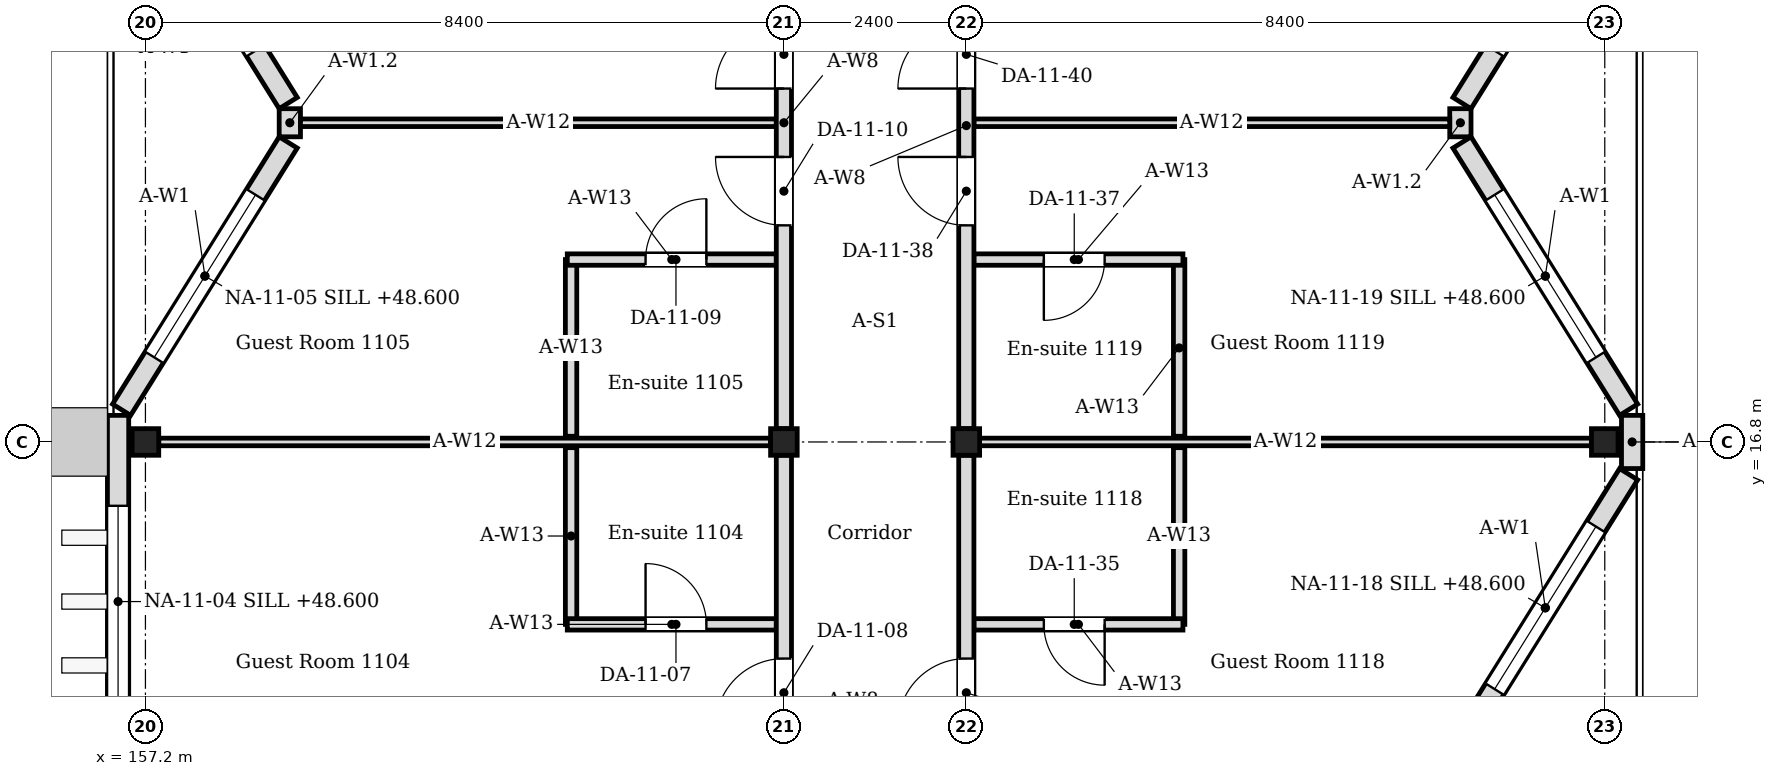
"""IFC4 building model, lengths in metres.
Left out: names, types, materials, properties, quantities, classifications, styles, units other than length and angle.
Written with IfcOpenShell. Run it as: python <this file> out.ifc"""

import sys

from ifc_helpers import new_model, si_unit, direction, frame, frame_2d, origin, origin_2d, place, context, subcontext, project, spatial, rectangle, i_section, extrude, element, fill, save


model = new_model("IFC4")
c1 = context("Model", 3, precision=1e-05, world=origin(), true_north=direction((0.0, 1.0)))
c2 = subcontext(c1, "Body", "Model", "MODEL_VIEW")
j1 = project(units=[si_unit("LENGTHUNIT", "METRE"), si_unit("PLANEANGLEUNIT", "RADIAN")], contexts=[c1])
p1 = place(None, origin())
s1 = spatial("IfcSite", under=j1, at=p1, CompositionType="ELEMENT")
p2 = place(p1, origin())
s2 = spatial("IfcBuilding", under=s1, at=p2, CompositionType="ELEMENT")
p3 = place(p2, frame((0.0, 0.0, 48.0)))
s3 = spatial("IfcBuildingStorey", under=s2, at=p3, CompositionType="ELEMENT", Elevation=48.0)
for number, where, z_axis, x_axis in (
    (1, (157.2, 16.8, 0.0), (0.0, 0.0, 1.0), (1.0, 0.0, 0.0)),
    (2, (165.6, 16.8, 0.0), (0.0, 0.0, 1.0), (1.0, 0.0, 0.0)),
    (3, (168.0, 16.8, 0.0), (0.0, 0.0, 1.0), (1.0, 0.0, 0.0)),
    (4, (176.4, 16.8, 0.0), (0.0, 0.0, 1.0), (1.0, 0.0, 0.0)),
):
    element("IfcColumn", number, at=place(p3, frame(where, z_axis=z_axis, x_axis=x_axis)), inside=s3, PredefinedType="COLUMN", context=c2, shape_type="SweptSolid", body=[
        extrude(i_section(OverallWidth=0.35, OverallDepth=0.35, WebThickness=0.012, FlangeThickness=0.019, FilletRadius=0.013, at=origin_2d()), origin(), (0.0, 0.0, 1.0), 4.2),
    ])
p4 = place(p3, frame((156.84, 8.05, 0.0), z_axis=(0.0, 0.0, 1.0), x_axis=(0.0, 1.0, 0.0)))
e5 = element("IfcWall", 5, at=p4, inside=s3, PredefinedType="SOLIDWALL", context=c2, shape_type="SweptSolid", body=[
    extrude(rectangle(XDim=9.1, YDim=0.28, at=frame_2d((4.55, 0.0))), origin(), (0.0, 0.0, 1.0), 4.05),
])
p5 = place(p4, frame((1.19, 0.0, 0.6)))
e6 = element("IfcOpeningElement", 6, at=p5, cuts=e5, PredefinedType="OPENING", context=c2, shape_type="SweptSolid", body=[
    extrude(rectangle(XDim=2.52, YDim=2.4, at=frame_2d((1.26, 1.2))), frame((0.0, 0.15, 0.0), z_axis=(0.0, -1.0, 0.0), x_axis=(1.0, 0.0, 0.0)), (0.0, 0.0, 1.0), 0.3),
])
p6 = place(p4, frame((5.39, 0.0, 0.6)))
e7 = element("IfcOpeningElement", 7, at=p6, cuts=e5, PredefinedType="OPENING", context=c2, shape_type="SweptSolid", body=[
    extrude(rectangle(XDim=2.52, YDim=2.4, at=frame_2d((1.26, 1.2))), frame((0.0, 0.15, 0.0), z_axis=(0.0, -1.0, 0.0), x_axis=(1.0, 0.0, 0.0)), (0.0, 0.0, 1.0), 0.3),
])
p7 = place(p3, frame((156.886, 17.224, 0.0), z_axis=(0.0, 0.0, 1.0), x_axis=(0.529018946142, 0.848610013271, 0.0)))
e8 = element("IfcWall", 8, at=p7, inside=s3, PredefinedType="SOLIDWALL", context=c2, shape_type="SweptSolid", body=[
    extrude(rectangle(XDim=4.144, YDim=0.28, at=frame_2d((2.072, 0.0))), origin(), (0.0, 0.0, 1.0), 4.05),
])
p8 = place(p7, frame((0.812, 0.0, 0.6)))
e9 = element("IfcOpeningElement", 9, at=p8, cuts=e8, PredefinedType="OPENING", context=c2, shape_type="SweptSolid", body=[
    extrude(rectangle(XDim=2.52, YDim=2.4, at=frame_2d((1.26, 1.2))), frame((0.0, 0.15, 0.0), z_axis=(0.0, -1.0, 0.0), x_axis=(1.0, 0.0, 0.0)), (0.0, 0.0, 1.0), 0.3),
])
p9 = place(p3, frame((159.079, 21.259, 0.0), z_axis=(0.0, 0.0, 1.0), x_axis=(-0.529018946142, 0.848610013271, 0.0)))
e10 = element("IfcWall", 10, at=p9, inside=s3, PredefinedType="SOLIDWALL", context=c2, shape_type="SweptSolid", body=[
    extrude(rectangle(XDim=4.144, YDim=0.28, at=frame_2d((2.072, 0.0))), origin(), (0.0, 0.0, 1.0), 4.05),
])
p10 = place(p9, frame((0.812, 0.0, 0.6)))
e11 = element("IfcOpeningElement", 11, at=p10, cuts=e10, PredefinedType="OPENING", context=c2, shape_type="SweptSolid", body=[
    extrude(rectangle(XDim=2.52, YDim=2.4, at=frame_2d((1.26, 1.2))), frame((0.0, 0.15, 0.0), z_axis=(0.0, -1.0, 0.0), x_axis=(1.0, 0.0, 0.0)), (0.0, 0.0, 1.0), 0.3),
])
p11 = place(p3, frame((159.1, 20.815, 0.0), z_axis=(0.0, 0.0, 1.0), x_axis=(0.0, 1.0, 0.0)))
e12 = element("IfcWall", 12, at=p11, inside=s3, PredefinedType="SOLIDWALL", context=c2, shape_type="SweptSolid", body=[
    extrude(rectangle(XDim=0.37, YDim=0.28, at=frame_2d((0.185, 0.0))), origin(), (0.0, 0.0, 1.0), 3.604),
])
p12 = place(p3, frame((174.521, 12.859, 0.0), z_axis=(0.0, 0.0, 1.0), x_axis=(0.528992500338, 0.848626498871, 0.0)))
e13 = element("IfcWall", 13, at=p12, inside=s3, PredefinedType="SOLIDWALL", context=c2, shape_type="SweptSolid", body=[
    extrude(rectangle(XDim=4.145, YDim=0.28, at=frame_2d((2.072, 0.0))), origin(), (0.0, 0.0, 1.0), 4.05),
])
p13 = place(p12, frame((0.812, 0.0, 0.6)))
e14 = element("IfcOpeningElement", 14, at=p13, cuts=e13, PredefinedType="OPENING", context=c2, shape_type="SweptSolid", body=[
    extrude(rectangle(XDim=2.52, YDim=2.4, at=frame_2d((1.26, 1.2))), frame((0.0, 0.15, 0.0), z_axis=(0.0, -1.0, 0.0), x_axis=(1.0, 0.0, 0.0)), (0.0, 0.0, 1.0), 0.3),
])
p14 = place(p3, frame((176.76, 16.45, 0.0), z_axis=(0.0, 0.0, 1.0), x_axis=(0.0, 1.0, 0.0)))
e15 = element("IfcWall", 15, at=p14, inside=s3, PredefinedType="SOLIDWALL", context=c2, shape_type="SweptSolid", body=[
    extrude(rectangle(XDim=0.7, YDim=0.28, at=frame_2d((0.35, 0.0))), origin(), (0.0, 0.0, 1.0), 4.05),
])
p15 = place(p3, frame((176.714, 17.224, 0.0), z_axis=(0.0, 0.0, 1.0), x_axis=(-0.529018946142, 0.848610013271, 0.0)))
e16 = element("IfcWall", 16, at=p15, inside=s3, PredefinedType="SOLIDWALL", context=c2, shape_type="SweptSolid", body=[
    extrude(rectangle(XDim=4.144, YDim=0.28, at=frame_2d((2.072, 0.0))), origin(), (0.0, 0.0, 1.0), 4.05),
])
p16 = place(p15, frame((0.812, 0.0, 0.6)))
e17 = element("IfcOpeningElement", 17, at=p16, cuts=e16, PredefinedType="OPENING", context=c2, shape_type="SweptSolid", body=[
    extrude(rectangle(XDim=2.52, YDim=2.4, at=frame_2d((1.26, 1.2))), frame((0.0, 0.15, 0.0), z_axis=(0.0, -1.0, 0.0), x_axis=(1.0, 0.0, 0.0)), (0.0, 0.0, 1.0), 0.3),
])
p17 = place(p3, frame((174.521, 21.259, 0.0), z_axis=(0.0, 0.0, 1.0), x_axis=(0.529018946142, 0.848610013271, 0.0)))
e18 = element("IfcWall", 18, at=p17, inside=s3, PredefinedType="SOLIDWALL", context=c2, shape_type="SweptSolid", body=[
    extrude(rectangle(XDim=4.144, YDim=0.28, at=frame_2d((2.072, 0.0))), origin(), (0.0, 0.0, 1.0), 4.05),
])
p18 = place(p17, frame((0.812, 0.0, 0.6)))
e19 = element("IfcOpeningElement", 19, at=p18, cuts=e18, PredefinedType="OPENING", context=c2, shape_type="SweptSolid", body=[
    extrude(rectangle(XDim=2.52, YDim=2.4, at=frame_2d((1.26, 1.2))), frame((0.0, 0.15, 0.0), z_axis=(0.0, -1.0, 0.0), x_axis=(1.0, 0.0, 0.0)), (0.0, 0.0, 1.0), 0.3),
])
p19 = place(p3, frame((174.5, 20.815, 0.0), z_axis=(0.0, 0.0, 1.0), x_axis=(0.0, 1.0, 0.0)))
e20 = element("IfcWall", 20, at=p19, inside=s3, PredefinedType="SOLIDWALL", context=c2, shape_type="SweptSolid", body=[
    extrude(rectangle(XDim=0.37, YDim=0.28, at=frame_2d((0.185, 0.0))), origin(), (0.0, 0.0, 1.0), 3.604),
])
p20 = place(p3, frame((162.8, 14.4, 0.0), z_axis=(0.0, 0.0, 1.0), x_axis=(0.0, 1.0, 0.0)))
e21 = element("IfcWall", 21, at=p20, inside=s3, PredefinedType="PARTITIONING", context=c2, shape_type="SweptSolid", body=[
    extrude(rectangle(XDim=2.325, YDim=0.15, at=frame_2d((1.163, 0.0))), origin(), (0.0, 0.0, 1.0), 4.05),
])
p21 = place(p3, frame((162.75, 14.4, 0.0), z_axis=(0.0, 0.0, 1.0), x_axis=(1.0, 0.0, 0.0)))
e22 = element("IfcWall", 22, at=p21, inside=s3, PredefinedType="PARTITIONING", context=c2, shape_type="SweptSolid", body=[
    extrude(rectangle(XDim=2.75, YDim=0.15, at=frame_2d((1.375, 0.0))), origin(), (0.0, 0.0, 1.0), 4.05),
])
p22 = place(p21, frame((1.03, 0.0, 0.0)))
e23 = element("IfcOpeningElement", 23, at=p22, cuts=e22, PredefinedType="OPENING", context=c2, shape_type="SweptSolid", body=[
    extrude(rectangle(XDim=0.8, YDim=2.1, at=frame_2d((0.4, 1.05))), frame((0.0, 0.085, 0.0), z_axis=(0.0, -1.0, 0.0), x_axis=(1.0, 0.0, 0.0)), (0.0, 0.0, 1.0), 0.17),
])
p23 = place(p3, frame((162.8, 16.875, 0.0), z_axis=(0.0, 0.0, 1.0), x_axis=(0.0, 1.0, 0.0)))
e24 = element("IfcWall", 24, at=p23, inside=s3, PredefinedType="PARTITIONING", context=c2, shape_type="SweptSolid", body=[
    extrude(rectangle(XDim=2.325, YDim=0.15, at=frame_2d((1.163, 0.0))), origin(), (0.0, 0.0, 1.0), 4.05),
])
p24 = place(p3, frame((162.75, 19.2, 0.0), z_axis=(0.0, 0.0, 1.0), x_axis=(1.0, 0.0, 0.0)))
e25 = element("IfcWall", 25, at=p24, inside=s3, PredefinedType="PARTITIONING", context=c2, shape_type="SweptSolid", body=[
    extrude(rectangle(XDim=2.75, YDim=0.15, at=frame_2d((1.375, 0.0))), origin(), (0.0, 0.0, 1.0), 4.05),
])
p25 = place(p24, frame((1.03, 0.0, 0.0)))
e26 = element("IfcOpeningElement", 26, at=p25, cuts=e25, PredefinedType="OPENING", context=c2, shape_type="SweptSolid", body=[
    extrude(rectangle(XDim=0.8, YDim=2.1, at=frame_2d((0.4, 1.05))), frame((0.0, 0.085, 0.0), z_axis=(0.0, -1.0, 0.0), x_axis=(1.0, 0.0, 0.0)), (0.0, 0.0, 1.0), 0.17),
])
p26 = place(p3, frame((170.8, 14.4, 0.0), z_axis=(0.0, 0.0, 1.0), x_axis=(0.0, 1.0, 0.0)))
e27 = element("IfcWall", 27, at=p26, inside=s3, PredefinedType="PARTITIONING", context=c2, shape_type="SweptSolid", body=[
    extrude(rectangle(XDim=2.325, YDim=0.15, at=frame_2d((1.163, 0.0))), origin(), (0.0, 0.0, 1.0), 4.05),
])
p27 = place(p3, frame((170.85, 14.4, 0.0), z_axis=(0.0, 0.0, 1.0), x_axis=(-1.0, 0.0, 0.0)))
e28 = element("IfcWall", 28, at=p27, inside=s3, PredefinedType="PARTITIONING", context=c2, shape_type="SweptSolid", body=[
    extrude(rectangle(XDim=2.75, YDim=0.15, at=frame_2d((1.375, 0.0))), origin(), (0.0, 0.0, 1.0), 4.05),
])
p28 = place(p27, frame((1.03, 0.0, 0.0)))
e29 = element("IfcOpeningElement", 29, at=p28, cuts=e28, PredefinedType="OPENING", context=c2, shape_type="SweptSolid", body=[
    extrude(rectangle(XDim=0.8, YDim=2.1, at=frame_2d((0.4, 1.05))), frame((0.0, 0.085, 0.0), z_axis=(0.0, -1.0, 0.0), x_axis=(1.0, 0.0, 0.0)), (0.0, 0.0, 1.0), 0.17),
])
p29 = place(p3, frame((170.8, 16.875, 0.0), z_axis=(0.0, 0.0, 1.0), x_axis=(0.0, 1.0, 0.0)))
e30 = element("IfcWall", 30, at=p29, inside=s3, PredefinedType="PARTITIONING", context=c2, shape_type="SweptSolid", body=[
    extrude(rectangle(XDim=2.325, YDim=0.15, at=frame_2d((1.163, 0.0))), origin(), (0.0, 0.0, 1.0), 4.05),
])
p30 = place(p3, frame((170.85, 19.2, 0.0), z_axis=(0.0, 0.0, 1.0), x_axis=(-1.0, 0.0, 0.0)))
e31 = element("IfcWall", 31, at=p30, inside=s3, PredefinedType="PARTITIONING", context=c2, shape_type="SweptSolid", body=[
    extrude(rectangle(XDim=2.75, YDim=0.15, at=frame_2d((1.375, 0.0))), origin(), (0.0, 0.0, 1.0), 4.05),
])
p31 = place(p30, frame((1.03, 0.0, 0.0)))
e32 = element("IfcOpeningElement", 32, at=p31, cuts=e31, PredefinedType="OPENING", context=c2, shape_type="SweptSolid", body=[
    extrude(rectangle(XDim=0.8, YDim=2.1, at=frame_2d((0.4, 1.05))), frame((0.0, 0.085, 0.0), z_axis=(0.0, -1.0, 0.0), x_axis=(1.0, 0.0, 0.0)), (0.0, 0.0, 1.0), 0.17),
])
for number, where, z_axis, x_axis in (
    (33, (157.375, 16.8, 0.0), (0.0, 0.0, 1.0), (1.0, 0.0, 0.0)),
    (34, (168.175, 16.8, 0.0), (0.0, 0.0, 1.0), (1.0, 0.0, 0.0)),
):
    element("IfcWall", number, at=place(p3, frame(where, z_axis=z_axis, x_axis=x_axis)), inside=s3, PredefinedType="PARTITIONING", context=c2, shape_type="SweptSolid", body=[
        extrude(rectangle(XDim=8.05, YDim=0.1, at=frame_2d((4.025, 0.0))), origin(), (0.0, 0.0, 1.0), 3.604),
    ])
for number, where, z_axis, x_axis in (
    (35, (159.24, 21.0, 0.0), (0.0, 0.0, 1.0), (1.0, 0.0, 0.0)),
    (36, (168.1, 21.0, 0.0), (0.0, 0.0, 1.0), (1.0, 0.0, 0.0)),
):
    element("IfcWall", number, at=place(p3, frame(where, z_axis=z_axis, x_axis=x_axis)), inside=s3, PredefinedType="PARTITIONING", context=c2, shape_type="SweptSolid", body=[
        extrude(rectangle(XDim=6.26, YDim=0.1, at=frame_2d((3.13, 0.0))), origin(), (0.0, 0.0, 1.0), 3.604),
    ])
p32 = place(p3, frame((165.6, 8.575, 0.0), z_axis=(0.0, 0.0, 1.0), x_axis=(0.0, 1.0, 0.0)))
e37 = element("IfcWall", 37, at=p32, inside=s3, PredefinedType="PARTITIONING", context=c2, shape_type="SweptSolid", body=[
    extrude(rectangle(XDim=8.05, YDim=0.2, at=frame_2d((4.025, 0.0))), origin(), (0.0, 0.0, 1.0), 3.45),
])
p33 = place(p32, frame((2.675, 0.0, 0.0)))
e38 = element("IfcOpeningElement", 38, at=p33, cuts=e37, PredefinedType="OPENING", context=c2, shape_type="SweptSolid", body=[
    extrude(rectangle(XDim=0.9, YDim=2.1, at=frame_2d((0.45, 1.05))), frame((0.0, 0.11, 0.0), z_axis=(0.0, -1.0, 0.0), x_axis=(1.0, 0.0, 0.0)), (0.0, 0.0, 1.0), 0.22),
])
p34 = place(p32, frame((4.475, 0.0, 0.0)))
e39 = element("IfcOpeningElement", 39, at=p34, cuts=e37, PredefinedType="OPENING", context=c2, shape_type="SweptSolid", body=[
    extrude(rectangle(XDim=0.9, YDim=2.1, at=frame_2d((0.45, 1.05))), frame((0.0, 0.11, 0.0), z_axis=(0.0, -1.0, 0.0), x_axis=(1.0, 0.0, 0.0)), (0.0, 0.0, 1.0), 0.22),
])
p35 = place(p3, frame((165.6, 16.975, 0.0), z_axis=(0.0, 0.0, 1.0), x_axis=(0.0, 1.0, 0.0)))
e40 = element("IfcWall", 40, at=p35, inside=s3, PredefinedType="PARTITIONING", context=c2, shape_type="SweptSolid", body=[
    extrude(rectangle(XDim=8.05, YDim=0.2, at=frame_2d((4.025, 0.0))), origin(), (0.0, 0.0, 1.0), 3.45),
])
p36 = place(p35, frame((2.675, 0.0, 0.0)))
e41 = element("IfcOpeningElement", 41, at=p36, cuts=e40, PredefinedType="OPENING", context=c2, shape_type="SweptSolid", body=[
    extrude(rectangle(XDim=0.9, YDim=2.1, at=frame_2d((0.45, 1.05))), frame((0.0, 0.11, 0.0), z_axis=(0.0, -1.0, 0.0), x_axis=(1.0, 0.0, 0.0)), (0.0, 0.0, 1.0), 0.22),
])
p37 = place(p35, frame((4.475, 0.0, 0.0)))
e42 = element("IfcOpeningElement", 42, at=p37, cuts=e40, PredefinedType="OPENING", context=c2, shape_type="SweptSolid", body=[
    extrude(rectangle(XDim=0.9, YDim=2.1, at=frame_2d((0.45, 1.05))), frame((0.0, 0.11, 0.0), z_axis=(0.0, -1.0, 0.0), x_axis=(1.0, 0.0, 0.0)), (0.0, 0.0, 1.0), 0.22),
])
p38 = place(p3, frame((168.0, 8.6, 0.0), z_axis=(0.0, 0.0, 1.0), x_axis=(0.0, 1.0, 0.0)))
e43 = element("IfcWall", 43, at=p38, inside=s3, PredefinedType="PARTITIONING", context=c2, shape_type="SweptSolid", body=[
    extrude(rectangle(XDim=8.025, YDim=0.2, at=frame_2d((4.012, 0.0))), origin(), (0.0, 0.0, 1.0), 3.45),
])
p39 = place(p38, frame((2.65, 0.0, 0.0)))
e44 = element("IfcOpeningElement", 44, at=p39, cuts=e43, PredefinedType="OPENING", context=c2, shape_type="SweptSolid", body=[
    extrude(rectangle(XDim=0.9, YDim=2.1, at=frame_2d((0.45, 1.05))), frame((0.0, 0.11, 0.0), z_axis=(0.0, -1.0, 0.0), x_axis=(1.0, 0.0, 0.0)), (0.0, 0.0, 1.0), 0.22),
])
p40 = place(p38, frame((4.45, 0.0, 0.0)))
e45 = element("IfcOpeningElement", 45, at=p40, cuts=e43, PredefinedType="OPENING", context=c2, shape_type="SweptSolid", body=[
    extrude(rectangle(XDim=0.9, YDim=2.1, at=frame_2d((0.45, 1.05))), frame((0.0, 0.11, 0.0), z_axis=(0.0, -1.0, 0.0), x_axis=(1.0, 0.0, 0.0)), (0.0, 0.0, 1.0), 0.22),
])
p41 = place(p3, frame((168.0, 16.975, 0.0), z_axis=(0.0, 0.0, 1.0), x_axis=(0.0, 1.0, 0.0)))
e46 = element("IfcWall", 46, at=p41, inside=s3, PredefinedType="PARTITIONING", context=c2, shape_type="SweptSolid", body=[
    extrude(rectangle(XDim=7.975, YDim=0.2, at=frame_2d((3.987, 0.0))), origin(), (0.0, 0.0, 1.0), 3.45),
])
p42 = place(p41, frame((2.675, 0.0, 0.0)))
e47 = element("IfcOpeningElement", 47, at=p42, cuts=e46, PredefinedType="OPENING", context=c2, shape_type="SweptSolid", body=[
    extrude(rectangle(XDim=0.9, YDim=2.1, at=frame_2d((0.45, 1.05))), frame((0.0, 0.11, 0.0), z_axis=(0.0, -1.0, 0.0), x_axis=(1.0, 0.0, 0.0)), (0.0, 0.0, 1.0), 0.22),
])
p43 = place(p41, frame((4.475, 0.0, 0.0)))
e48 = element("IfcOpeningElement", 48, at=p43, cuts=e46, PredefinedType="OPENING", context=c2, shape_type="SweptSolid", body=[
    extrude(rectangle(XDim=0.9, YDim=2.1, at=frame_2d((0.45, 1.05))), frame((0.0, 0.11, 0.0), z_axis=(0.0, -1.0, 0.0), x_axis=(1.0, 0.0, 0.0)), (0.0, 0.0, 1.0), 0.22),
])
p44 = place(p6, origin())
e49 = element("IfcWindow", 49, at=p44, inside=s3, PartitioningType="SINGLE_PANEL", PredefinedType="WINDOW", context=c2, shape_type="SweptSolid", body=[
    extrude(rectangle(XDim=2.52, YDim=2.4, at=frame_2d((1.26, 1.2))), frame((0.0, 0.03, 0.0), z_axis=(0.0, -1.0, 0.0), x_axis=(1.0, 0.0, 0.0)), (0.0, 0.0, 1.0), 0.06),
])
fill(e7, e49)
p45 = place(p8, origin())
e50 = element("IfcWindow", 50, at=p45, inside=s3, PartitioningType="SINGLE_PANEL", PredefinedType="WINDOW", context=c2, shape_type="SweptSolid", body=[
    extrude(rectangle(XDim=2.52, YDim=2.4, at=frame_2d((1.26, 1.2))), frame((0.0, 0.03, 0.0), z_axis=(0.0, -1.0, 0.0), x_axis=(1.0, 0.0, 0.0)), (0.0, 0.0, 1.0), 0.06),
])
fill(e9, e50)
p46 = place(p13, origin())
e51 = element("IfcWindow", 51, at=p46, inside=s3, PartitioningType="SINGLE_PANEL", PredefinedType="WINDOW", context=c2, shape_type="SweptSolid", body=[
    extrude(rectangle(XDim=2.52, YDim=2.4, at=frame_2d((1.26, 1.2))), frame((0.0, 0.03, 0.0), z_axis=(0.0, -1.0, 0.0), x_axis=(1.0, 0.0, 0.0)), (0.0, 0.0, 1.0), 0.06),
])
fill(e14, e51)
p47 = place(p16, origin())
e52 = element("IfcWindow", 52, at=p47, inside=s3, PartitioningType="SINGLE_PANEL", PredefinedType="WINDOW", context=c2, shape_type="SweptSolid", body=[
    extrude(rectangle(XDim=2.52, YDim=2.4, at=frame_2d((1.26, 1.2))), frame((0.0, 0.03, 0.0), z_axis=(0.0, -1.0, 0.0), x_axis=(1.0, 0.0, 0.0)), (0.0, 0.0, 1.0), 0.06),
])
fill(e17, e52)
p48 = place(p22, origin())
e53 = element("IfcDoor", 53, at=p48, inside=s3, OperationType="SINGLE_SWING_LEFT", PredefinedType="DOOR", context=c2, shape_type="SweptSolid", body=[
    extrude(rectangle(XDim=0.8, YDim=2.1, at=frame_2d((0.4, 1.05))), frame((0.0, 0.025, 0.0), z_axis=(0.0, -1.0, 0.0), x_axis=(1.0, 0.0, 0.0)), (0.0, 0.0, 1.0), 0.05),
])
fill(e23, e53)
p49 = place(p34, origin())
e54 = element("IfcDoor", 54, at=p49, inside=s3, OperationType="SINGLE_SWING_LEFT", PredefinedType="DOOR", context=c2, shape_type="SweptSolid", body=[
    extrude(rectangle(XDim=0.9, YDim=2.1, at=frame_2d((0.45, 1.05))), frame((0.0, 0.025, 0.0), z_axis=(0.0, -1.0, 0.0), x_axis=(1.0, 0.0, 0.0)), (0.0, 0.0, 1.0), 0.05),
])
fill(e39, e54)
p50 = place(p25, origin())
e55 = element("IfcDoor", 55, at=p50, inside=s3, OperationType="SINGLE_SWING_RIGHT", PredefinedType="DOOR", context=c2, shape_type="SweptSolid", body=[
    extrude(rectangle(XDim=0.8, YDim=2.1, at=frame_2d((0.4, 1.05))), frame((0.0, 0.025, 0.0), z_axis=(0.0, -1.0, 0.0), x_axis=(1.0, 0.0, 0.0)), (0.0, 0.0, 1.0), 0.05),
])
fill(e26, e55)
p51 = place(p36, origin())
e56 = element("IfcDoor", 56, at=p51, inside=s3, OperationType="SINGLE_SWING_RIGHT", PredefinedType="DOOR", context=c2, shape_type="SweptSolid", body=[
    extrude(rectangle(XDim=0.9, YDim=2.1, at=frame_2d((0.45, 1.05))), frame((0.0, 0.025, 0.0), z_axis=(0.0, -1.0, 0.0), x_axis=(1.0, 0.0, 0.0)), (0.0, 0.0, 1.0), 0.05),
])
fill(e41, e56)
p52 = place(p37, origin())
e57 = element("IfcDoor", 57, at=p52, inside=s3, OperationType="SINGLE_SWING_LEFT", PredefinedType="DOOR", context=c2, shape_type="SweptSolid", body=[
    extrude(rectangle(XDim=0.9, YDim=2.1, at=frame_2d((0.45, 1.05))), frame((0.0, 0.025, 0.0), z_axis=(0.0, -1.0, 0.0), x_axis=(1.0, 0.0, 0.0)), (0.0, 0.0, 1.0), 0.05),
])
fill(e42, e57)
p53 = place(p28, origin())
e58 = element("IfcDoor", 58, at=p53, inside=s3, OperationType="SINGLE_SWING_LEFT", PredefinedType="DOOR", context=c2, shape_type="SweptSolid", body=[
    extrude(rectangle(XDim=0.8, YDim=2.1, at=frame_2d((0.4, 1.05))), frame((0.0, 0.025, 0.0), z_axis=(0.0, -1.0, 0.0), x_axis=(1.0, 0.0, 0.0)), (0.0, 0.0, 1.0), 0.05),
])
fill(e29, e58)
p54 = place(p40, origin())
e59 = element("IfcDoor", 59, at=p54, inside=s3, OperationType="SINGLE_SWING_LEFT", PredefinedType="DOOR", context=c2, shape_type="SweptSolid", body=[
    extrude(rectangle(XDim=0.9, YDim=2.1, at=frame_2d((0.45, 1.05))), frame((0.0, 0.025, 0.0), z_axis=(0.0, -1.0, 0.0), x_axis=(1.0, 0.0, 0.0)), (0.0, 0.0, 1.0), 0.05),
])
fill(e45, e59)
p55 = place(p31, origin())
e60 = element("IfcDoor", 60, at=p55, inside=s3, OperationType="SINGLE_SWING_RIGHT", PredefinedType="DOOR", context=c2, shape_type="SweptSolid", body=[
    extrude(rectangle(XDim=0.8, YDim=2.1, at=frame_2d((0.4, 1.05))), frame((0.0, 0.025, 0.0), z_axis=(0.0, -1.0, 0.0), x_axis=(1.0, 0.0, 0.0)), (0.0, 0.0, 1.0), 0.05),
])
fill(e32, e60)
p56 = place(p42, origin())
e61 = element("IfcDoor", 61, at=p56, inside=s3, OperationType="SINGLE_SWING_RIGHT", PredefinedType="DOOR", context=c2, shape_type="SweptSolid", body=[
    extrude(rectangle(XDim=0.9, YDim=2.1, at=frame_2d((0.45, 1.05))), frame((0.0, 0.025, 0.0), z_axis=(0.0, -1.0, 0.0), x_axis=(1.0, 0.0, 0.0)), (0.0, 0.0, 1.0), 0.05),
])
fill(e47, e61)
p57 = place(p43, origin())
e62 = element("IfcDoor", 62, at=p57, inside=s3, OperationType="SINGLE_SWING_LEFT", PredefinedType="DOOR", context=c2, shape_type="SweptSolid", body=[
    extrude(rectangle(XDim=0.9, YDim=2.1, at=frame_2d((0.45, 1.05))), frame((0.0, 0.025, 0.0), z_axis=(0.0, -1.0, 0.0), x_axis=(1.0, 0.0, 0.0)), (0.0, 0.0, 1.0), 0.05),
])
fill(e48, e62)
save(model, sys.argv[1])
